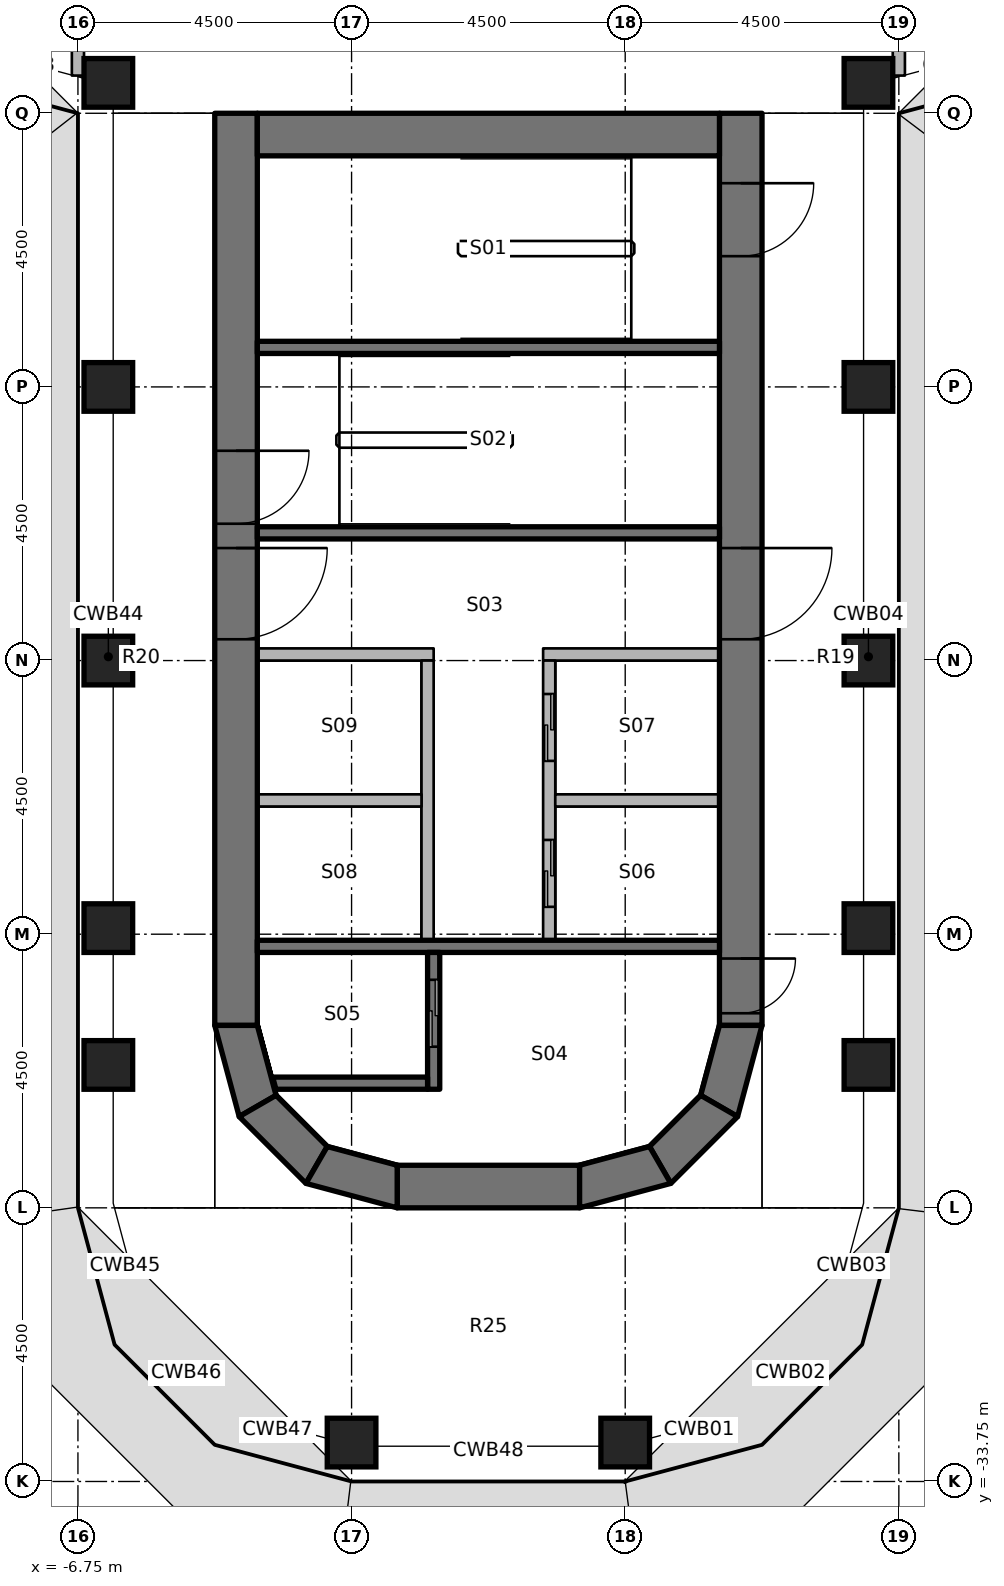
"""IFC4 building model, lengths in metres.
Left out: names, types, materials, properties, quantities, classifications, styles, units other than length and angle.
Written with IfcOpenShell. Run it as: python <this file> out.ifc"""

import sys

from ifc_helpers import new_model, si_unit, direction, frame, frame_2d, origin, origin_2d, place, context, subcontext, project, spatial, polyline, rectangle, outline, extrude, element, fill, save


model = new_model("IFC4")
c1 = context("Model", 3, precision=1e-05, world=origin(), true_north=direction((0.0, 1.0)))
c2 = subcontext(c1, "Body", "Model", "MODEL_VIEW")
j1 = project(units=[si_unit("LENGTHUNIT", "METRE"), si_unit("PLANEANGLEUNIT", "RADIAN")], contexts=[c1])
p1 = place(None, origin())
s1 = spatial("IfcSite", under=j1, at=p1, CompositionType="ELEMENT")
p2 = place(p1, origin())
s2 = spatial("IfcBuilding", under=s1, at=p2, CompositionType="ELEMENT")
p3 = place(p2, frame((0.0, 0.0, 141.0)))
s3 = spatial("IfcBuildingStorey", under=s2, at=p3, CompositionType="ELEMENT", Elevation=141.0)
for number, where, z_axis, x_axis in (
    (1, (-6.25, -26.9, 0.0), (0.0, 0.0, 1.0), (1.0, 0.0, 0.0)),
    (2, (-6.25, -24.65, 0.0), (0.0, 0.0, 1.0), (1.0, 0.0, 0.0)),
    (3, (-6.25, -20.25, 0.0), (0.0, 0.0, 1.0), (1.0, 0.0, 0.0)),
    (4, (-6.25, -15.75, 0.0), (0.0, 0.0, 1.0), (1.0, 0.0, 0.0)),
    (5, (-6.25, -10.75, 0.0), (0.0, 0.0, 1.0), (1.0, 0.0, 0.0)),
    (6, (-2.25, -33.11, 0.0), (0.0, 0.0, 1.0), (1.0, 0.0, 0.0)),
    (7, (2.25, -33.11, 0.0), (0.0, 0.0, 1.0), (1.0, 0.0, 0.0)),
    (8, (6.25, -26.9, 0.0), (0.0, 0.0, 1.0), (1.0, 0.0, 0.0)),
    (9, (6.25, -24.65, 0.0), (0.0, 0.0, 1.0), (1.0, 0.0, 0.0)),
    (10, (6.25, -20.25, 0.0), (0.0, 0.0, 1.0), (1.0, 0.0, 0.0)),
    (11, (6.25, -15.75, 0.0), (0.0, 0.0, 1.0), (1.0, 0.0, 0.0)),
    (12, (6.25, -10.75, 0.0), (0.0, 0.0, 1.0), (1.0, 0.0, 0.0)),
):
    element("IfcColumn", number, at=place(p3, frame(where, z_axis=z_axis, x_axis=x_axis)), inside=s3, PredefinedType="COLUMN", context=c2, shape_type="SweptSolid", body=[
        extrude(rectangle(XDim=0.8, YDim=0.8, at=origin_2d()), origin(), (0.0, 0.0, 1.0), 3.65),
    ])
p4 = place(p3, frame((-4.15, -11.25, 0.0), z_axis=(0.0, 0.0, 1.0), x_axis=(0.0, -1.0, 0.0)))
e13 = element("IfcWall", 13, at=p4, inside=s3, PredefinedType="SHEAR", context=c2, shape_type="SweptSolid", body=[
    extrude(rectangle(XDim=15.0, YDim=0.7, at=frame_2d((7.5, 0.0))), origin(), (0.0, 0.0, 1.0), 3.8),
])
p5 = place(p4, frame((7.15, 0.0, 0.0)))
e14 = element("IfcOpeningElement", 14, at=p5, cuts=e13, PredefinedType="OPENING", context=c2, shape_type="SweptSolid", body=[
    extrude(rectangle(XDim=1.5, YDim=2.3, at=frame_2d((0.75, 1.15))), frame((0.0, 0.36, 0.0), z_axis=(0.0, -1.0, 0.0), x_axis=(1.0, 0.0, 0.0)), (0.0, 0.0, 1.0), 0.72),
])
p6 = place(p4, frame((5.55, 0.0, 0.0)))
e15 = element("IfcOpeningElement", 15, at=p6, cuts=e13, PredefinedType="OPENING", context=c2, shape_type="SweptSolid", body=[
    extrude(rectangle(XDim=1.2, YDim=2.1, at=frame_2d((0.6, 1.05))), frame((0.0, 0.36, 0.0), z_axis=(0.0, -1.0, 0.0), x_axis=(1.0, 0.0, 0.0)), (0.0, 0.0, 1.0), 0.72),
])
p7 = place(p3, frame((4.15, -11.25, 0.0), z_axis=(0.0, 0.0, 1.0), x_axis=(0.0, -1.0, 0.0)))
e16 = element("IfcWall", 16, at=p7, inside=s3, PredefinedType="SHEAR", context=c2, shape_type="SweptSolid", body=[
    extrude(rectangle(XDim=15.0, YDim=0.7, at=frame_2d((7.5, 0.0))), origin(), (0.0, 0.0, 1.0), 3.8),
])
p8 = place(p7, frame((7.15, 0.0, 0.0)))
e17 = element("IfcOpeningElement", 17, at=p8, cuts=e16, PredefinedType="OPENING", context=c2, shape_type="SweptSolid", body=[
    extrude(rectangle(XDim=1.5, YDim=2.3, at=frame_2d((0.75, 1.15))), frame((0.0, 0.36, 0.0), z_axis=(0.0, -1.0, 0.0), x_axis=(1.0, 0.0, 0.0)), (0.0, 0.0, 1.0), 0.72),
])
p9 = place(p7, frame((13.9, 0.0, 0.0)))
e18 = element("IfcOpeningElement", 18, at=p9, cuts=e16, PredefinedType="OPENING", context=c2, shape_type="SweptSolid", body=[
    extrude(rectangle(XDim=0.9, YDim=2.1, at=frame_2d((0.45, 1.05))), frame((0.0, 0.36, 0.0), z_axis=(0.0, -1.0, 0.0), x_axis=(1.0, 0.0, 0.0)), (0.0, 0.0, 1.0), 0.72),
])
p10 = place(p7, frame((1.15, 0.0, 0.0)))
e19 = element("IfcOpeningElement", 19, at=p10, cuts=e16, PredefinedType="OPENING", context=c2, shape_type="SweptSolid", body=[
    extrude(rectangle(XDim=1.2, YDim=2.1, at=frame_2d((0.6, 1.05))), frame((0.0, 0.36, 0.0), z_axis=(0.0, -1.0, 0.0), x_axis=(1.0, 0.0, 0.0)), (0.0, 0.0, 1.0), 0.72),
])
p11 = place(p3, frame((-3.8, -11.6, 0.0), z_axis=(0.0, 0.0, 1.0), x_axis=(1.0, 0.0, 0.0)))
e20 = element("IfcWall", 20, at=p11, inside=s3, PredefinedType="SHEAR", context=c2, shape_type="SweptSolid", body=[
    extrude(rectangle(XDim=7.6, YDim=0.7, at=frame_2d((3.8, 0.0))), origin(), (0.0, 0.0, 1.0), 3.8),
])
p12 = place(p3, frame((-1.5, -28.9, 0.0), z_axis=(0.0, 0.0, 1.0), x_axis=(1.0, 0.0, 0.0)))
e21 = element("IfcWall", 21, at=p12, inside=s3, PredefinedType="SHEAR", context=c2, shape_type="SweptSolid", body=[
    extrude(rectangle(XDim=3.0, YDim=0.7, at=frame_2d((1.5, 0.0))), origin(), (0.0, 0.0, 1.0), 3.8),
])
p13 = place(p3, origin())
e22 = element("IfcWall", 22, at=p13, inside=s3, PredefinedType="SHEAR", context=c2, shape_type="SweptSolid", body=[
    extrude(outline(polyline([(-4.5, -26.25), (-4.098, -27.75), (-3.492, -27.4), (-3.8, -26.25), (-4.5, -26.25)])), origin(), (0.0, 0.0, 1.0), 3.8),
])
p14 = place(p3, origin())
e23 = element("IfcWall", 23, at=p14, inside=s3, PredefinedType="SHEAR", context=c2, shape_type="SweptSolid", body=[
    extrude(outline(polyline([(-4.098, -27.75), (-3.0, -28.848), (-2.65, -28.242), (-3.492, -27.4), (-4.098, -27.75)])), origin(), (0.0, 0.0, 1.0), 3.8),
])
p15 = place(p3, origin())
e24 = element("IfcWall", 24, at=p15, inside=s3, PredefinedType="SHEAR", context=c2, shape_type="SweptSolid", body=[
    extrude(outline(polyline([(-3.0, -28.848), (-1.5, -29.25), (-1.5, -28.55), (-2.65, -28.242), (-3.0, -28.848)])), origin(), (0.0, 0.0, 1.0), 3.8),
])
p16 = place(p3, origin())
e25 = element("IfcWall", 25, at=p16, inside=s3, PredefinedType="SHEAR", context=c2, shape_type="SweptSolid", body=[
    extrude(outline(polyline([(4.5, -26.25), (4.098, -27.75), (3.492, -27.4), (3.8, -26.25), (4.5, -26.25)])), origin(), (0.0, 0.0, 1.0), 3.8),
])
p17 = place(p3, origin())
e26 = element("IfcWall", 26, at=p17, inside=s3, PredefinedType="SHEAR", context=c2, shape_type="SweptSolid", body=[
    extrude(outline(polyline([(4.098, -27.75), (3.0, -28.848), (2.65, -28.242), (3.492, -27.4), (4.098, -27.75)])), origin(), (0.0, 0.0, 1.0), 3.8),
])
p18 = place(p3, origin())
e27 = element("IfcWall", 27, at=p18, inside=s3, PredefinedType="SHEAR", context=c2, shape_type="SweptSolid", body=[
    extrude(outline(polyline([(3.0, -28.848), (1.5, -29.25), (1.5, -28.55), (2.65, -28.242), (3.0, -28.848)])), origin(), (0.0, 0.0, 1.0), 3.8),
])
p19 = place(p3, frame((3.8, -24.95, 0.0), z_axis=(0.0, 0.0, 1.0), x_axis=(-1.0, 0.0, 0.0)))
e28 = element("IfcWall", 28, at=p19, inside=s3, PredefinedType="SHEAR", context=c2, shape_type="SweptSolid", body=[
    extrude(rectangle(XDim=7.6, YDim=0.2, at=frame_2d((3.8, 0.0))), origin(), (0.0, 0.0, 1.0), 3.65),
])
p20 = place(p3, frame((-0.9, -27.3, 0.0), z_axis=(0.0, 0.0, 1.0), x_axis=(0.0, 1.0, 0.0)))
e29 = element("IfcWall", 29, at=p20, inside=s3, PredefinedType="SHEAR", context=c2, shape_type="SweptSolid", body=[
    extrude(rectangle(XDim=2.25, YDim=0.2, at=frame_2d((1.125, 0.0))), origin(), (0.0, 0.0, 1.0), 3.65),
])
p21 = place(p20, frame((0.7, 0.0, 0.0)))
e30 = element("IfcOpeningElement", 30, at=p21, cuts=e29, PredefinedType="OPENING", context=c2, shape_type="SweptSolid", body=[
    extrude(rectangle(XDim=1.1, YDim=2.3, at=frame_2d((0.55, 1.15))), frame((0.0, 0.11, 0.0), z_axis=(0.0, -1.0, 0.0), x_axis=(1.0, 0.0, 0.0)), (0.0, 0.0, 1.0), 0.22),
])
p22 = place(p3, origin())
e31 = element("IfcWall", 31, at=p22, inside=s3, PredefinedType="SHEAR", context=c2, shape_type="SweptSolid", body=[
    extrude(outline(polyline([(-1.0, -27.1), (-3.548, -27.1), (-3.494, -27.3), (-1.0, -27.3), (-1.0, -27.1)])), origin(), (0.0, 0.0, 1.0), 3.65),
])
for number, where, z_axis, x_axis in (
    (32, (3.8, -18.15, 0.0), (0.0, 0.0, 1.0), (-1.0, 0.0, 0.0)),
    (33, (3.8, -15.1, 0.0), (0.0, 0.0, 1.0), (-1.0, 0.0, 0.0)),
):
    element("IfcWall", number, at=place(p3, frame(where, z_axis=z_axis, x_axis=x_axis)), inside=s3, PredefinedType="SHEAR", context=c2, shape_type="SweptSolid", body=[
        extrude(rectangle(XDim=7.6, YDim=0.2, at=frame_2d((3.8, 0.0))), origin(), (0.0, 0.0, 1.0), 3.65),
    ])
p23 = place(p3, frame((3.8, -20.15, 0.0), z_axis=(0.0, 0.0, 1.0), x_axis=(-1.0, 0.0, 0.0)))
e34 = element("IfcWall", 34, at=p23, inside=s3, PredefinedType="PARTITIONING", context=c2, shape_type="SweptSolid", body=[
    extrude(rectangle(XDim=2.9, YDim=0.2, at=frame_2d((1.45, 0.0))), origin(), (0.0, 0.0, 1.0), 3.65),
])
p24 = place(p3, frame((1.0, -24.85, 0.0), z_axis=(0.0, 0.0, 1.0), x_axis=(0.0, 1.0, 0.0)))
e35 = element("IfcWall", 35, at=p24, inside=s3, PredefinedType="PARTITIONING", context=c2, shape_type="SweptSolid", body=[
    extrude(rectangle(XDim=4.6, YDim=0.2, at=frame_2d((2.3, 0.0))), origin(), (0.0, 0.0, 1.0), 3.65),
])
p25 = place(p24, frame((0.55, 0.0, 0.0)))
e36 = element("IfcOpeningElement", 36, at=p25, cuts=e35, PredefinedType="OPENING", context=c2, shape_type="SweptSolid", body=[
    extrude(rectangle(XDim=1.1, YDim=2.3, at=frame_2d((0.55, 1.15))), frame((0.0, 0.11, 0.0), z_axis=(0.0, -1.0, 0.0), x_axis=(1.0, 0.0, 0.0)), (0.0, 0.0, 1.0), 0.22),
])
p26 = place(p24, frame((2.95, 0.0, 0.0)))
e37 = element("IfcOpeningElement", 37, at=p26, cuts=e35, PredefinedType="OPENING", context=c2, shape_type="SweptSolid", body=[
    extrude(rectangle(XDim=1.1, YDim=2.3, at=frame_2d((0.55, 1.15))), frame((0.0, 0.11, 0.0), z_axis=(0.0, -1.0, 0.0), x_axis=(1.0, 0.0, 0.0)), (0.0, 0.0, 1.0), 0.22),
])
p27 = place(p3, frame((-0.9, -20.15, 0.0), z_axis=(0.0, 0.0, 1.0), x_axis=(-1.0, 0.0, 0.0)))
e38 = element("IfcWall", 38, at=p27, inside=s3, PredefinedType="PARTITIONING", context=c2, shape_type="SweptSolid", body=[
    extrude(rectangle(XDim=2.9, YDim=0.2, at=frame_2d((1.45, 0.0))), origin(), (0.0, 0.0, 1.0), 3.65),
])
p28 = place(p3, frame((-1.0, -24.85, 0.0), z_axis=(0.0, 0.0, 1.0), x_axis=(0.0, 1.0, 0.0)))
e39 = element("IfcWall", 39, at=p28, inside=s3, PredefinedType="PARTITIONING", context=c2, shape_type="SweptSolid", body=[
    extrude(rectangle(XDim=4.6, YDim=0.2, at=frame_2d((2.3, 0.0))), origin(), (0.0, 0.0, 1.0), 3.65),
])
for number, where, z_axis, x_axis in (
    (40, (3.8, -22.55, 0.0), (0.0, 0.0, 1.0), (-1.0, 0.0, 0.0)),
    (41, (-1.1, -22.55, 0.0), (0.0, 0.0, 1.0), (-1.0, 0.0, 0.0)),
):
    element("IfcWall", number, at=place(p3, frame(where, z_axis=z_axis, x_axis=x_axis)), inside=s3, PredefinedType="PARTITIONING", context=c2, shape_type="SweptSolid", body=[
        extrude(rectangle(XDim=2.7, YDim=0.2, at=frame_2d((1.35, 0.0))), origin(), (0.0, 0.0, 1.0), 3.65),
    ])
p29 = place(p3, frame((6.75, -10.63, 0.0), z_axis=(0.0, 0.0, 1.0), x_axis=(0.0, 1.0, 0.0)))
e42 = element("IfcWall", 42, at=p29, inside=s3, PredefinedType="PARTITIONING", context=c2, shape_type="SweptSolid", body=[
    extrude(rectangle(XDim=3.78, YDim=0.2, at=frame_2d((1.89, 0.0))), origin(), (0.0, 0.0, 1.0), 2.75),
])
p30 = place(p3, frame((-6.75, -10.63, 0.0), z_axis=(0.0, 0.0, 1.0), x_axis=(0.0, 1.0, 0.0)))
e43 = element("IfcWall", 43, at=p30, inside=s3, PredefinedType="PARTITIONING", context=c2, shape_type="SweptSolid", body=[
    extrude(rectangle(XDim=3.78, YDim=0.2, at=frame_2d((1.89, 0.0))), origin(), (0.0, 0.0, 1.0), 2.75),
])
p31 = place(p30, frame((1.44, 0.0, 0.0)))
e44 = element("IfcOpeningElement", 44, at=p31, cuts=e43, PredefinedType="OPENING", context=c2, shape_type="SweptSolid", body=[
    extrude(rectangle(XDim=0.9, YDim=2.1, at=frame_2d((0.45, 1.05))), frame((0.0, 0.11, 0.0), z_axis=(0.0, -1.0, 0.0), x_axis=(1.0, 0.0, 0.0)), (0.0, 0.0, 1.0), 0.22),
])
p32 = place(p8, origin())
e45 = element("IfcDoor", 45, at=p32, inside=s3, OperationType="DOUBLE_DOOR_SINGLE_SWING", PredefinedType="DOOR", context=c2, shape_type="SweptSolid", body=[
    extrude(rectangle(XDim=1.5, YDim=2.3, at=frame_2d((0.75, 1.15))), frame((0.0, 0.025, 0.0), z_axis=(0.0, -1.0, 0.0), x_axis=(1.0, 0.0, 0.0)), (0.0, 0.0, 1.0), 0.05),
])
fill(e17, e45)
p33 = place(p5, origin())
e46 = element("IfcDoor", 46, at=p33, inside=s3, OperationType="DOUBLE_DOOR_SINGLE_SWING", PredefinedType="DOOR", context=c2, shape_type="SweptSolid", body=[
    extrude(rectangle(XDim=1.5, YDim=2.3, at=frame_2d((0.75, 1.15))), frame((0.0, 0.025, 0.0), z_axis=(0.0, -1.0, 0.0), x_axis=(1.0, 0.0, 0.0)), (0.0, 0.0, 1.0), 0.05),
])
fill(e14, e46)
p34 = place(p9, origin())
e47 = element("IfcDoor", 47, at=p34, inside=s3, OperationType="SINGLE_SWING_LEFT", PredefinedType="DOOR", context=c2, shape_type="SweptSolid", body=[
    extrude(rectangle(XDim=0.9, YDim=2.1, at=frame_2d((0.45, 1.05))), frame((0.0, 0.025, 0.0), z_axis=(0.0, -1.0, 0.0), x_axis=(1.0, 0.0, 0.0)), (0.0, 0.0, 1.0), 0.05),
])
fill(e18, e47)
p35 = place(p6, origin())
e48 = element("IfcDoor", 48, at=p35, inside=s3, OperationType="SINGLE_SWING_LEFT", PredefinedType="DOOR", context=c2, shape_type="SweptSolid", body=[
    extrude(rectangle(XDim=1.2, YDim=2.1, at=frame_2d((0.6, 1.05))), frame((0.0, 0.025, 0.0), z_axis=(0.0, -1.0, 0.0), x_axis=(1.0, 0.0, 0.0)), (0.0, 0.0, 1.0), 0.05),
])
fill(e15, e48)
p36 = place(p10, origin())
e49 = element("IfcDoor", 49, at=p36, inside=s3, OperationType="SINGLE_SWING_LEFT", PredefinedType="DOOR", context=c2, shape_type="SweptSolid", body=[
    extrude(rectangle(XDim=1.2, YDim=2.1, at=frame_2d((0.6, 1.05))), frame((0.0, 0.025, 0.0), z_axis=(0.0, -1.0, 0.0), x_axis=(1.0, 0.0, 0.0)), (0.0, 0.0, 1.0), 0.05),
])
fill(e19, e49)
p37 = place(p21, origin())
e50 = element("IfcDoor", 50, at=p37, inside=s3, OperationType="DOUBLE_DOOR_SLIDING", PredefinedType="DOOR", context=c2, shape_type="SweptSolid", body=[
    extrude(rectangle(XDim=1.1, YDim=2.3, at=frame_2d((0.55, 1.15))), frame((0.0, 0.025, 0.0), z_axis=(0.0, -1.0, 0.0), x_axis=(1.0, 0.0, 0.0)), (0.0, 0.0, 1.0), 0.05),
])
fill(e30, e50)
p38 = place(p25, origin())
e51 = element("IfcDoor", 51, at=p38, inside=s3, OperationType="DOUBLE_DOOR_SLIDING", PredefinedType="DOOR", context=c2, shape_type="SweptSolid", body=[
    extrude(rectangle(XDim=1.1, YDim=2.3, at=frame_2d((0.55, 1.15))), frame((0.0, 0.025, 0.0), z_axis=(0.0, -1.0, 0.0), x_axis=(1.0, 0.0, 0.0)), (0.0, 0.0, 1.0), 0.05),
])
fill(e36, e51)
p39 = place(p26, origin())
e52 = element("IfcDoor", 52, at=p39, inside=s3, OperationType="DOUBLE_DOOR_SLIDING", PredefinedType="DOOR", context=c2, shape_type="SweptSolid", body=[
    extrude(rectangle(XDim=1.1, YDim=2.3, at=frame_2d((0.55, 1.15))), frame((0.0, 0.025, 0.0), z_axis=(0.0, -1.0, 0.0), x_axis=(1.0, 0.0, 0.0)), (0.0, 0.0, 1.0), 0.05),
])
fill(e37, e52)
save(model, sys.argv[1])
